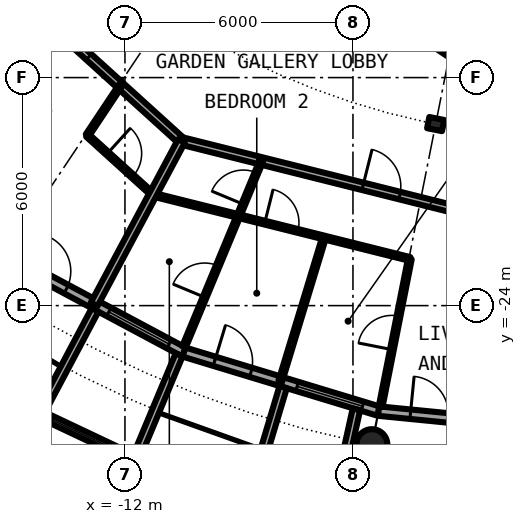
"""IFC4 building model, lengths in metres.
Left out: names, types, materials, properties, quantities, classifications, styles, units other than length and angle.
Written with IfcOpenShell. Run it as: python <this file> out.ifc"""

import sys

from ifc_helpers import new_model, si_unit, direction, frame, frame_2d, origin, origin_2d, place, context, subcontext, project, spatial, rectangle, circle, hollow_circle, i_section, extrude, element, fill, save


model = new_model("IFC4")
c1 = context("Model", 3, precision=1e-05, world=origin(), true_north=direction((0.0, 1.0)))
c2 = subcontext(c1, "Body", "Model", "MODEL_VIEW")
j1 = project(units=[si_unit("LENGTHUNIT", "METRE"), si_unit("PLANEANGLEUNIT", "RADIAN")], contexts=[c1])
p1 = place(None, origin())
s1 = spatial("IfcSite", under=j1, at=p1, CompositionType="ELEMENT")
p2 = place(p1, origin())
s2 = spatial("IfcBuilding", under=s1, at=p2, CompositionType="ELEMENT")
p3 = place(p2, frame((0.0, 0.0, 190.2)))
s3 = spatial("IfcBuildingStorey", under=s2, at=p3, CompositionType="ELEMENT", Elevation=190.2)
p4 = place(p3, frame((-5.501, -27.658, 0.0), z_axis=(0.0, 0.0, 1.0), x_axis=(1.0, 0.0, 0.0)))
e1 = element("IfcColumn", 1, at=p4, inside=s3, PredefinedType="COLUMN", context=c2, shape_type="SweptSolid", body=[
    extrude(hollow_circle(Radius=0.406, WallThickness=0.03, at=origin_2d()), origin(), (0.0, 0.0, 1.0), 3.05),
])
p5 = place(p3, frame((-3.824, -19.223, 0.0), z_axis=(0.0, 0.0, 1.0), x_axis=(-0.195090322016, -0.980785280403, 0.0)))
e2 = element("IfcColumn", 2, at=p5, inside=s3, PredefinedType="COLUMN", context=c2, shape_type="SweptSolid", body=[
    extrude(i_section(OverallWidth=0.3, OverallDepth=0.4, WebThickness=0.013, FlangeThickness=0.024, FilletRadius=0.027, at=origin_2d()), origin(), (0.0, 0.0, 1.0), 3.05),
])
p6 = place(p3, frame((-15.167, -22.699, 0.0), z_axis=(0.0, 0.0, 1.0), x_axis=(0.881915646801, -0.471407246368, 0.0)))
e3 = element("IfcWall", 3, at=p6, inside=s3, PredefinedType="SOLIDWALL", context=c2, shape_type="SweptSolid", body=[
    extrude(rectangle(XDim=5.352, YDim=0.25, at=frame_2d((2.676, 0.0))), origin(), (0.0, 0.0, 1.0), 2.7),
])
p7 = place(p6, frame((0.841, 0.0, 0.0)))
e4 = element("IfcOpeningElement", 4, at=p7, cuts=e3, PredefinedType="OPENING", context=c2, shape_type="SweptSolid", body=[
    extrude(rectangle(XDim=1.0, YDim=2.2, at=frame_2d((0.5, 1.1))), frame((0.0, 0.135, 0.0), z_axis=(0.0, -1.0, 0.0), x_axis=(1.0, 0.0, 0.0)), (0.0, 0.0, 1.0), 0.27),
])
p8 = place(p6, frame((3.111, 0.0, 0.3)))
e5 = element("IfcOpeningElement", 5, at=p8, cuts=e3, PredefinedType="OPENING", context=c2, shape_type="SweptSolid", body=[
    extrude(rectangle(XDim=1.8, YDim=2.1, at=frame_2d((0.9, 1.05))), frame((0.0, 0.135, 0.0), z_axis=(0.0, -1.0, 0.0), x_axis=(1.0, 0.0, 0.0)), (0.0, 0.0, 1.0), 0.27),
])
p9 = place(p3, frame((-14.335, -26.808, -0.03), z_axis=(0.0, 0.0, 1.0), x_axis=(0.904000060331, -0.427532327342, 0.0)))
e6 = element("IfcWall", 6, at=p9, inside=s3, PredefinedType="SOLIDWALL", context=c2, shape_type="SweptSolid", body=[
    extrude(rectangle(XDim=2.993, YDim=0.2, at=frame_2d((1.497, 0.0))), origin(), (0.0, 0.0, 1.0), 2.73),
])
p10 = place(p9, frame((0.457, 0.0, 0.33)))
e7 = element("IfcOpeningElement", 7, at=p10, cuts=e6, PredefinedType="OPENING", context=c2, shape_type="SweptSolid", body=[
    extrude(circle(Radius=1.04, at=frame_2d((1.04, 1.04))), frame((0.0, 0.11, 0.0), z_axis=(0.0, -1.0, 0.0), x_axis=(1.0, 0.0, 0.0)), (0.0, 0.0, 1.0), 0.22),
])
p11 = place(p3, frame((-12.787, -24.113, -0.03), z_axis=(0.0, 0.0, 1.0), x_axis=(-0.468365282436, -0.883534924159, 0.0)))
e8 = element("IfcWall", 8, at=p11, inside=s3, PredefinedType="SOLIDWALL", context=c2, shape_type="SweptSolid", body=[
    extrude(rectangle(XDim=3.006, YDim=0.2, at=frame_2d((1.503, 0.0))), origin(), (0.0, 0.0, 1.0), 2.73),
])
p12 = place(p3, frame((-10.575, -25.295, -0.03), z_axis=(0.0, 0.0, 1.0), x_axis=(-0.385697364644, -0.922625353492, 0.0)))
e9 = element("IfcWall", 9, at=p12, inside=s3, PredefinedType="SOLIDWALL", context=c2, shape_type="SweptSolid", body=[
    extrude(rectangle(XDim=2.883, YDim=0.2, at=frame_2d((1.442, 0.0))), origin(), (0.0, 0.0, 1.0), 2.73),
])
p13 = place(p3, frame((-10.447, -25.222, 0.0), z_axis=(0.0, 0.0, 1.0), x_axis=(0.956965678721, -0.290201119486, 0.0)))
e10 = element("IfcWall", 10, at=p13, inside=s3, PredefinedType="SOLIDWALL", context=c2, shape_type="SweptSolid", body=[
    extrude(rectangle(XDim=5.351, YDim=0.25, at=frame_2d((2.676, 0.0))), origin(), (0.0, 0.0, 1.0), 2.7),
])
p14 = place(p13, frame((0.841, 0.0, 0.0)))
e11 = element("IfcOpeningElement", 11, at=p14, cuts=e10, PredefinedType="OPENING", context=c2, shape_type="SweptSolid", body=[
    extrude(rectangle(XDim=1.0, YDim=2.2, at=frame_2d((0.5, 1.1))), frame((0.0, 0.135, 0.0), z_axis=(0.0, -1.0, 0.0), x_axis=(1.0, 0.0, 0.0)), (0.0, 0.0, 1.0), 0.27),
])
p15 = place(p13, frame((3.111, 0.0, 0.3)))
e12 = element("IfcOpeningElement", 12, at=p15, cuts=e10, PredefinedType="OPENING", context=c2, shape_type="SweptSolid", body=[
    extrude(rectangle(XDim=1.8, YDim=2.1, at=frame_2d((0.9, 1.05))), frame((0.0, 0.135, 0.0), z_axis=(0.0, -1.0, 0.0), x_axis=(1.0, 0.0, 0.0)), (0.0, 0.0, 1.0), 0.27),
])
p16 = place(p3, frame((-7.837, -26.144, -0.03), z_axis=(0.0, 0.0, 1.0), x_axis=(-0.287064767992, -0.957911174889, 0.0)))
e13 = element("IfcWall", 13, at=p16, inside=s3, PredefinedType="SOLIDWALL", context=c2, shape_type="SweptSolid", body=[
    extrude(rectangle(XDim=3.006, YDim=0.2, at=frame_2d((1.503, 0.0))), origin(), (0.0, 0.0, 1.0), 2.73),
])
p17 = place(p3, frame((-5.909, -26.729, -0.03), z_axis=(0.0, 0.0, 1.0), x_axis=(-0.216409053917, -0.976302781612, 0.0)))
e14 = element("IfcWall", 14, at=p17, inside=s3, PredefinedType="SOLIDWALL", context=c2, shape_type="SweptSolid", body=[
    extrude(rectangle(XDim=2.925, YDim=0.2, at=frame_2d((1.463, 0.0))), origin(), (0.0, 0.0, 1.0), 2.73),
])
p18 = place(p3, frame((-5.326, -26.775, 0.0), z_axis=(0.0, 0.0, 1.0), x_axis=(0.995173996315, -0.098126026407, 0.0)))
e15 = element("IfcWall", 15, at=p18, inside=s3, PredefinedType="SOLIDWALL", context=c2, shape_type="SweptSolid", body=[
    extrude(rectangle(XDim=5.352, YDim=0.25, at=frame_2d((2.676, 0.0))), origin(), (0.0, 0.0, 1.0), 2.7),
])
p19 = place(p18, frame((0.841, 0.0, 0.0)))
e16 = element("IfcOpeningElement", 16, at=p19, cuts=e15, PredefinedType="OPENING", context=c2, shape_type="SweptSolid", body=[
    extrude(rectangle(XDim=1.0, YDim=2.2, at=frame_2d((0.5, 1.1))), frame((0.0, 0.135, 0.0), z_axis=(0.0, -1.0, 0.0), x_axis=(1.0, 0.0, 0.0)), (0.0, 0.0, 1.0), 0.27),
])
p20 = place(p18, frame((3.111, 0.0, 0.3)))
e17 = element("IfcOpeningElement", 17, at=p20, cuts=e15, PredefinedType="OPENING", context=c2, shape_type="SweptSolid", body=[
    extrude(rectangle(XDim=1.8, YDim=2.1, at=frame_2d((0.9, 1.05))), frame((0.0, 0.135, 0.0), z_axis=(0.0, -1.0, 0.0), x_axis=(1.0, 0.0, 0.0)), (0.0, 0.0, 1.0), 0.27),
])
p21 = place(p3, frame((-12.988, -19.518, 0.0), z_axis=(0.0, 0.0, 1.0), x_axis=(0.741132356378, -0.671358942988, 0.0)))
e18 = element("IfcWall", 18, at=p21, inside=s3, PredefinedType="PARTITIONING", context=c2, shape_type="SweptSolid", body=[
    extrude(rectangle(XDim=2.323, YDim=0.1, at=frame_2d((1.162, 0.0))), origin(), (0.0, 0.0, 1.0), 2.7),
])
p22 = place(p21, frame((0.712, 0.0, 0.0)))
e19 = element("IfcOpeningElement", 19, at=p22, cuts=e18, PredefinedType="OPENING", context=c2, shape_type="SweptSolid", body=[
    extrude(rectangle(XDim=0.9, YDim=2.3, at=frame_2d((0.45, 1.15))), frame((0.0, 0.06, 0.0), z_axis=(0.0, -1.0, 0.0), x_axis=(1.0, 0.0, 0.0)), (0.0, 0.0, 1.0), 0.12),
])
p23 = place(p3, frame((-11.266, -21.08, 0.0), z_axis=(0.0, 0.0, 1.0), x_axis=(0.970080680347, -0.24278277043, 0.0)))
e20 = element("IfcWall", 20, at=p23, inside=s3, PredefinedType="PARTITIONING", context=c2, shape_type="SweptSolid", body=[
    extrude(rectangle(XDim=6.973, YDim=0.1, at=frame_2d((3.486, 0.0))), origin(), (0.0, 0.0, 1.0), 2.7),
])
p24 = place(p23, frame((3.036, 0.0, 0.0)))
e21 = element("IfcOpeningElement", 21, at=p24, cuts=e20, PredefinedType="OPENING", context=c2, shape_type="SweptSolid", body=[
    extrude(rectangle(XDim=0.9, YDim=2.3, at=frame_2d((0.45, 1.15))), frame((0.0, 0.06, 0.0), z_axis=(0.0, -1.0, 0.0), x_axis=(1.0, 0.0, 0.0)), (0.0, 0.0, 1.0), 0.12),
])
p25 = place(p3, frame((-18.542, -12.389, 0.0), z_axis=(0.0, 0.0, 1.0), x_axis=(0.74093897184, -0.671572363941, 0.0)))
e22 = element("IfcWall", 22, at=p25, inside=s3, PredefinedType="PARTITIONING", context=c2, shape_type="SweptSolid", body=[
    extrude(rectangle(XDim=10.84, YDim=0.2, at=frame_2d((5.42, 0.0))), origin(), (0.0, 0.0, 1.0), 2.7),
])
p26 = place(p25, frame((6.544, 0.0, 0.0)))
e23 = element("IfcOpeningElement", 23, at=p26, cuts=e22, PredefinedType="OPENING", context=c2, shape_type="SweptSolid", body=[
    extrude(rectangle(XDim=1.0, YDim=2.3, at=frame_2d((0.5, 1.15))), frame((0.0, 0.11, 0.0), z_axis=(0.0, -1.0, 0.0), x_axis=(1.0, 0.0, 0.0)), (0.0, 0.0, 1.0), 0.22),
])
p27 = place(p3, frame((-10.517, -19.665, 0.0), z_axis=(0.0, 0.0, 1.0), x_axis=(0.970023226325, -0.243012222716, 0.0)))
e24 = element("IfcWall", 24, at=p27, inside=s3, PredefinedType="PARTITIONING", context=c2, shape_type="SweptSolid", body=[
    extrude(rectangle(XDim=10.847, YDim=0.2, at=frame_2d((5.424, 0.0))), origin(), (0.0, 0.0, 1.0), 2.7),
])
p28 = place(p27, frame((4.924, 0.0, 0.0)))
e25 = element("IfcOpeningElement", 25, at=p28, cuts=e24, PredefinedType="OPENING", context=c2, shape_type="SweptSolid", body=[
    extrude(rectangle(XDim=1.0, YDim=2.3, at=frame_2d((0.5, 1.15))), frame((0.0, 0.11, 0.0), z_axis=(0.0, -1.0, 0.0), x_axis=(1.0, 0.0, 0.0)), (0.0, 0.0, 1.0), 0.22),
])
p29 = place(p3, frame((-14.717, -9.834, 0.0), z_axis=(0.0, 0.0, 1.0), x_axis=(0.831492679744, -0.555535708603, 0.0)))
e26 = element("IfcWall", 26, at=p29, inside=s3, PredefinedType="PARTITIONING", context=c2, shape_type="SweptSolid", body=[
    extrude(rectangle(XDim=13.549, YDim=0.2, at=frame_2d((6.775, 0.0))), origin(), (0.0, 0.0, 1.0), 2.7),
])
p30 = place(p29, frame((7.966, 0.0, 0.0)))
e27 = element("IfcOpeningElement", 27, at=p30, cuts=e26, PredefinedType="OPENING", context=c2, shape_type="SweptSolid", body=[
    extrude(rectangle(XDim=1.0, YDim=2.3, at=frame_2d((0.5, 1.15))), frame((0.0, 0.11, 0.0), z_axis=(0.0, -1.0, 0.0), x_axis=(1.0, 0.0, 0.0)), (0.0, 0.0, 1.0), 0.22),
])
p31 = place(p3, frame((-12.988, -19.518, 0.0), z_axis=(0.0, 0.0, 1.0), x_axis=(0.554125989098, 0.832432813028, 0.0)))
e28 = element("IfcWall", 28, at=p31, inside=s3, PredefinedType="PARTITIONING", context=c2, shape_type="SweptSolid", body=[
    extrude(rectangle(XDim=1.57, YDim=0.1, at=frame_2d((0.785, 0.0))), origin(), (0.0, 0.0, 1.0), 2.7),
])
p32 = place(p3, frame((-12.81, -23.966, 0.0), z_axis=(0.0, 0.0, 1.0), x_axis=(0.471427642527, 0.881904744211, 0.0)))
e29 = element("IfcWall", 29, at=p32, inside=s3, PredefinedType="PARTITIONING", context=c2, shape_type="SweptSolid", body=[
    extrude(rectangle(XDim=4.875, YDim=0.2, at=frame_2d((2.438, 0.0))), origin(), (0.0, 0.0, 1.0), 2.7),
])
p33 = place(p3, frame((-10.447, -25.086, 0.0), z_axis=(0.0, 0.0, 1.0), x_axis=(0.384363513821, 0.923181828917, 0.0)))
e30 = element("IfcWall", 30, at=p33, inside=s3, PredefinedType="PARTITIONING", context=c2, shape_type="SweptSolid", body=[
    extrude(rectangle(XDim=5.3, YDim=0.1, at=frame_2d((2.65, 0.0))), origin(), (0.0, 0.0, 1.0), 2.7),
])
p34 = place(p33, frame((4.065, 0.0, 0.0)))
e31 = element("IfcOpeningElement", 31, at=p34, cuts=e30, PredefinedType="OPENING", context=c2, shape_type="SweptSolid", body=[
    extrude(rectangle(XDim=0.9, YDim=2.3, at=frame_2d((0.45, 1.15))), frame((0.0, 0.06, 0.0), z_axis=(0.0, -1.0, 0.0), x_axis=(1.0, 0.0, 0.0)), (0.0, 0.0, 1.0), 0.12),
])
p35 = place(p33, frame((1.415, 0.0, 0.0)))
e32 = element("IfcOpeningElement", 32, at=p35, cuts=e30, PredefinedType="OPENING", context=c2, shape_type="SweptSolid", body=[
    extrude(rectangle(XDim=0.9, YDim=2.3, at=frame_2d((0.45, 1.15))), frame((0.0, 0.06, 0.0), z_axis=(0.0, -1.0, 0.0), x_axis=(1.0, 0.0, 0.0)), (0.0, 0.0, 1.0), 0.12),
])
p36 = place(p3, frame((-7.914, -25.997, 0.0), z_axis=(0.0, 0.0, 1.0), x_axis=(0.291291575636, 0.956634317785, 0.0)))
e33 = element("IfcWall", 33, at=p36, inside=s3, PredefinedType="PARTITIONING", context=c2, shape_type="SweptSolid", body=[
    extrude(rectangle(XDim=3.962, YDim=0.1, at=frame_2d((1.981, 0.0))), origin(), (0.0, 0.0, 1.0), 2.7),
])
p37 = place(p3, frame((-5.272, -26.659, 0.0), z_axis=(0.0, 0.0, 1.0), x_axis=(0.194089507313, 0.980983824103, 0.0)))
e34 = element("IfcWall", 34, at=p37, inside=s3, PredefinedType="PARTITIONING", context=c2, shape_type="SweptSolid", body=[
    extrude(rectangle(XDim=3.962, YDim=0.1, at=frame_2d((1.981, 0.0))), origin(), (0.0, 0.0, 1.0), 2.7),
])
p38 = place(p37, frame((1.531, 0.0, 0.0)))
e35 = element("IfcOpeningElement", 35, at=p38, cuts=e34, PredefinedType="OPENING", context=c2, shape_type="SweptSolid", body=[
    extrude(rectangle(XDim=0.9, YDim=2.3, at=frame_2d((0.45, 1.15))), frame((0.0, 0.06, 0.0), z_axis=(0.0, -1.0, 0.0), x_axis=(1.0, 0.0, 0.0)), (0.0, 0.0, 1.0), 0.12),
])
p39 = place(p7, origin())
e36 = element("IfcDoor", 36, at=p39, inside=s3, OperationType="SINGLE_SWING_LEFT", PredefinedType="DOOR", context=c2, shape_type="SweptSolid", body=[
    extrude(rectangle(XDim=1.0, YDim=2.2, at=frame_2d((0.5, 1.1))), frame((0.0, 0.025, 0.0), z_axis=(0.0, -1.0, 0.0), x_axis=(1.0, 0.0, 0.0)), (0.0, 0.0, 1.0), 0.05),
])
fill(e4, e36)
p40 = place(p8, origin())
e37 = element("IfcWindow", 37, at=p40, inside=s3, PartitioningType="SINGLE_PANEL", PredefinedType="WINDOW", context=c2, shape_type="SweptSolid", body=[
    extrude(rectangle(XDim=1.8, YDim=2.1, at=frame_2d((0.9, 1.05))), frame((0.0, 0.03, 0.0), z_axis=(0.0, -1.0, 0.0), x_axis=(1.0, 0.0, 0.0)), (0.0, 0.0, 1.0), 0.06),
])
fill(e5, e37)
p41 = place(p10, origin())
e38 = element("IfcWindow", 38, at=p41, inside=s3, PartitioningType="SINGLE_PANEL", PredefinedType="WINDOW", context=c2, shape_type="SweptSolid", body=[
    extrude(circle(Radius=1.04, at=frame_2d((1.04, 1.04))), frame((0.0, 0.03, 0.0), z_axis=(0.0, -1.0, 0.0), x_axis=(1.0, 0.0, 0.0)), (0.0, 0.0, 1.0), 0.06),
])
fill(e7, e38)
p42 = place(p14, origin())
e39 = element("IfcDoor", 39, at=p42, inside=s3, OperationType="SINGLE_SWING_LEFT", PredefinedType="DOOR", context=c2, shape_type="SweptSolid", body=[
    extrude(rectangle(XDim=1.0, YDim=2.2, at=frame_2d((0.5, 1.1))), frame((0.0, 0.025, 0.0), z_axis=(0.0, -1.0, 0.0), x_axis=(1.0, 0.0, 0.0)), (0.0, 0.0, 1.0), 0.05),
])
fill(e11, e39)
p43 = place(p15, origin())
e40 = element("IfcWindow", 40, at=p43, inside=s3, PartitioningType="SINGLE_PANEL", PredefinedType="WINDOW", context=c2, shape_type="SweptSolid", body=[
    extrude(rectangle(XDim=1.8, YDim=2.1, at=frame_2d((0.9, 1.05))), frame((0.0, 0.03, 0.0), z_axis=(0.0, -1.0, 0.0), x_axis=(1.0, 0.0, 0.0)), (0.0, 0.0, 1.0), 0.06),
])
fill(e12, e40)
p44 = place(p19, origin())
e41 = element("IfcDoor", 41, at=p44, inside=s3, OperationType="SINGLE_SWING_LEFT", PredefinedType="DOOR", context=c2, shape_type="SweptSolid", body=[
    extrude(rectangle(XDim=1.0, YDim=2.2, at=frame_2d((0.5, 1.1))), frame((0.0, 0.025, 0.0), z_axis=(0.0, -1.0, 0.0), x_axis=(1.0, 0.0, 0.0)), (0.0, 0.0, 1.0), 0.05),
])
fill(e16, e41)
p45 = place(p26, origin())
e42 = element("IfcDoor", 42, at=p45, inside=s3, OperationType="SINGLE_SWING_RIGHT", PredefinedType="DOOR", context=c2, shape_type="SweptSolid", body=[
    extrude(rectangle(XDim=1.0, YDim=2.3, at=frame_2d((0.5, 1.15))), frame((0.0, 0.025, 0.0), z_axis=(0.0, -1.0, 0.0), x_axis=(1.0, 0.0, 0.0)), (0.0, 0.0, 1.0), 0.05),
])
fill(e23, e42)
p46 = place(p22, origin())
e43 = element("IfcDoor", 43, at=p46, inside=s3, OperationType="SINGLE_SWING_RIGHT", PredefinedType="DOOR", context=c2, shape_type="SweptSolid", body=[
    extrude(rectangle(XDim=0.9, YDim=2.3, at=frame_2d((0.45, 1.15))), frame((0.0, 0.025, 0.0), z_axis=(0.0, -1.0, 0.0), x_axis=(1.0, 0.0, 0.0)), (0.0, 0.0, 1.0), 0.05),
])
fill(e19, e43)
p47 = place(p28, origin())
e44 = element("IfcDoor", 44, at=p47, inside=s3, OperationType="SINGLE_SWING_RIGHT", PredefinedType="DOOR", context=c2, shape_type="SweptSolid", body=[
    extrude(rectangle(XDim=1.0, YDim=2.3, at=frame_2d((0.5, 1.15))), frame((0.0, 0.025, 0.0), z_axis=(0.0, -1.0, 0.0), x_axis=(1.0, 0.0, 0.0)), (0.0, 0.0, 1.0), 0.05),
])
fill(e25, e44)
p48 = place(p34, origin())
e45 = element("IfcDoor", 45, at=p48, inside=s3, OperationType="SINGLE_SWING_RIGHT", PredefinedType="DOOR", context=c2, shape_type="SweptSolid", body=[
    extrude(rectangle(XDim=0.9, YDim=2.3, at=frame_2d((0.45, 1.15))), frame((0.0, 0.025, 0.0), z_axis=(0.0, -1.0, 0.0), x_axis=(1.0, 0.0, 0.0)), (0.0, 0.0, 1.0), 0.05),
])
fill(e31, e45)
p49 = place(p38, origin())
e46 = element("IfcDoor", 46, at=p49, inside=s3, OperationType="SINGLE_SWING_RIGHT", PredefinedType="DOOR", context=c2, shape_type="SweptSolid", body=[
    extrude(rectangle(XDim=0.9, YDim=2.3, at=frame_2d((0.45, 1.15))), frame((0.0, 0.025, 0.0), z_axis=(0.0, -1.0, 0.0), x_axis=(1.0, 0.0, 0.0)), (0.0, 0.0, 1.0), 0.05),
])
fill(e35, e46)
p50 = place(p24, origin())
e47 = element("IfcDoor", 47, at=p50, inside=s3, OperationType="SINGLE_SWING_LEFT", PredefinedType="DOOR", context=c2, shape_type="SweptSolid", body=[
    extrude(rectangle(XDim=0.9, YDim=2.3, at=frame_2d((0.45, 1.15))), frame((0.0, 0.025, 0.0), z_axis=(0.0, -1.0, 0.0), x_axis=(1.0, 0.0, 0.0)), (0.0, 0.0, 1.0), 0.05),
])
fill(e21, e47)
p51 = place(p35, origin())
e48 = element("IfcDoor", 48, at=p51, inside=s3, OperationType="SINGLE_SWING_LEFT", PredefinedType="DOOR", context=c2, shape_type="SweptSolid", body=[
    extrude(rectangle(XDim=0.9, YDim=2.3, at=frame_2d((0.45, 1.15))), frame((0.0, 0.025, 0.0), z_axis=(0.0, -1.0, 0.0), x_axis=(1.0, 0.0, 0.0)), (0.0, 0.0, 1.0), 0.05),
])
fill(e32, e48)
save(model, sys.argv[1])
